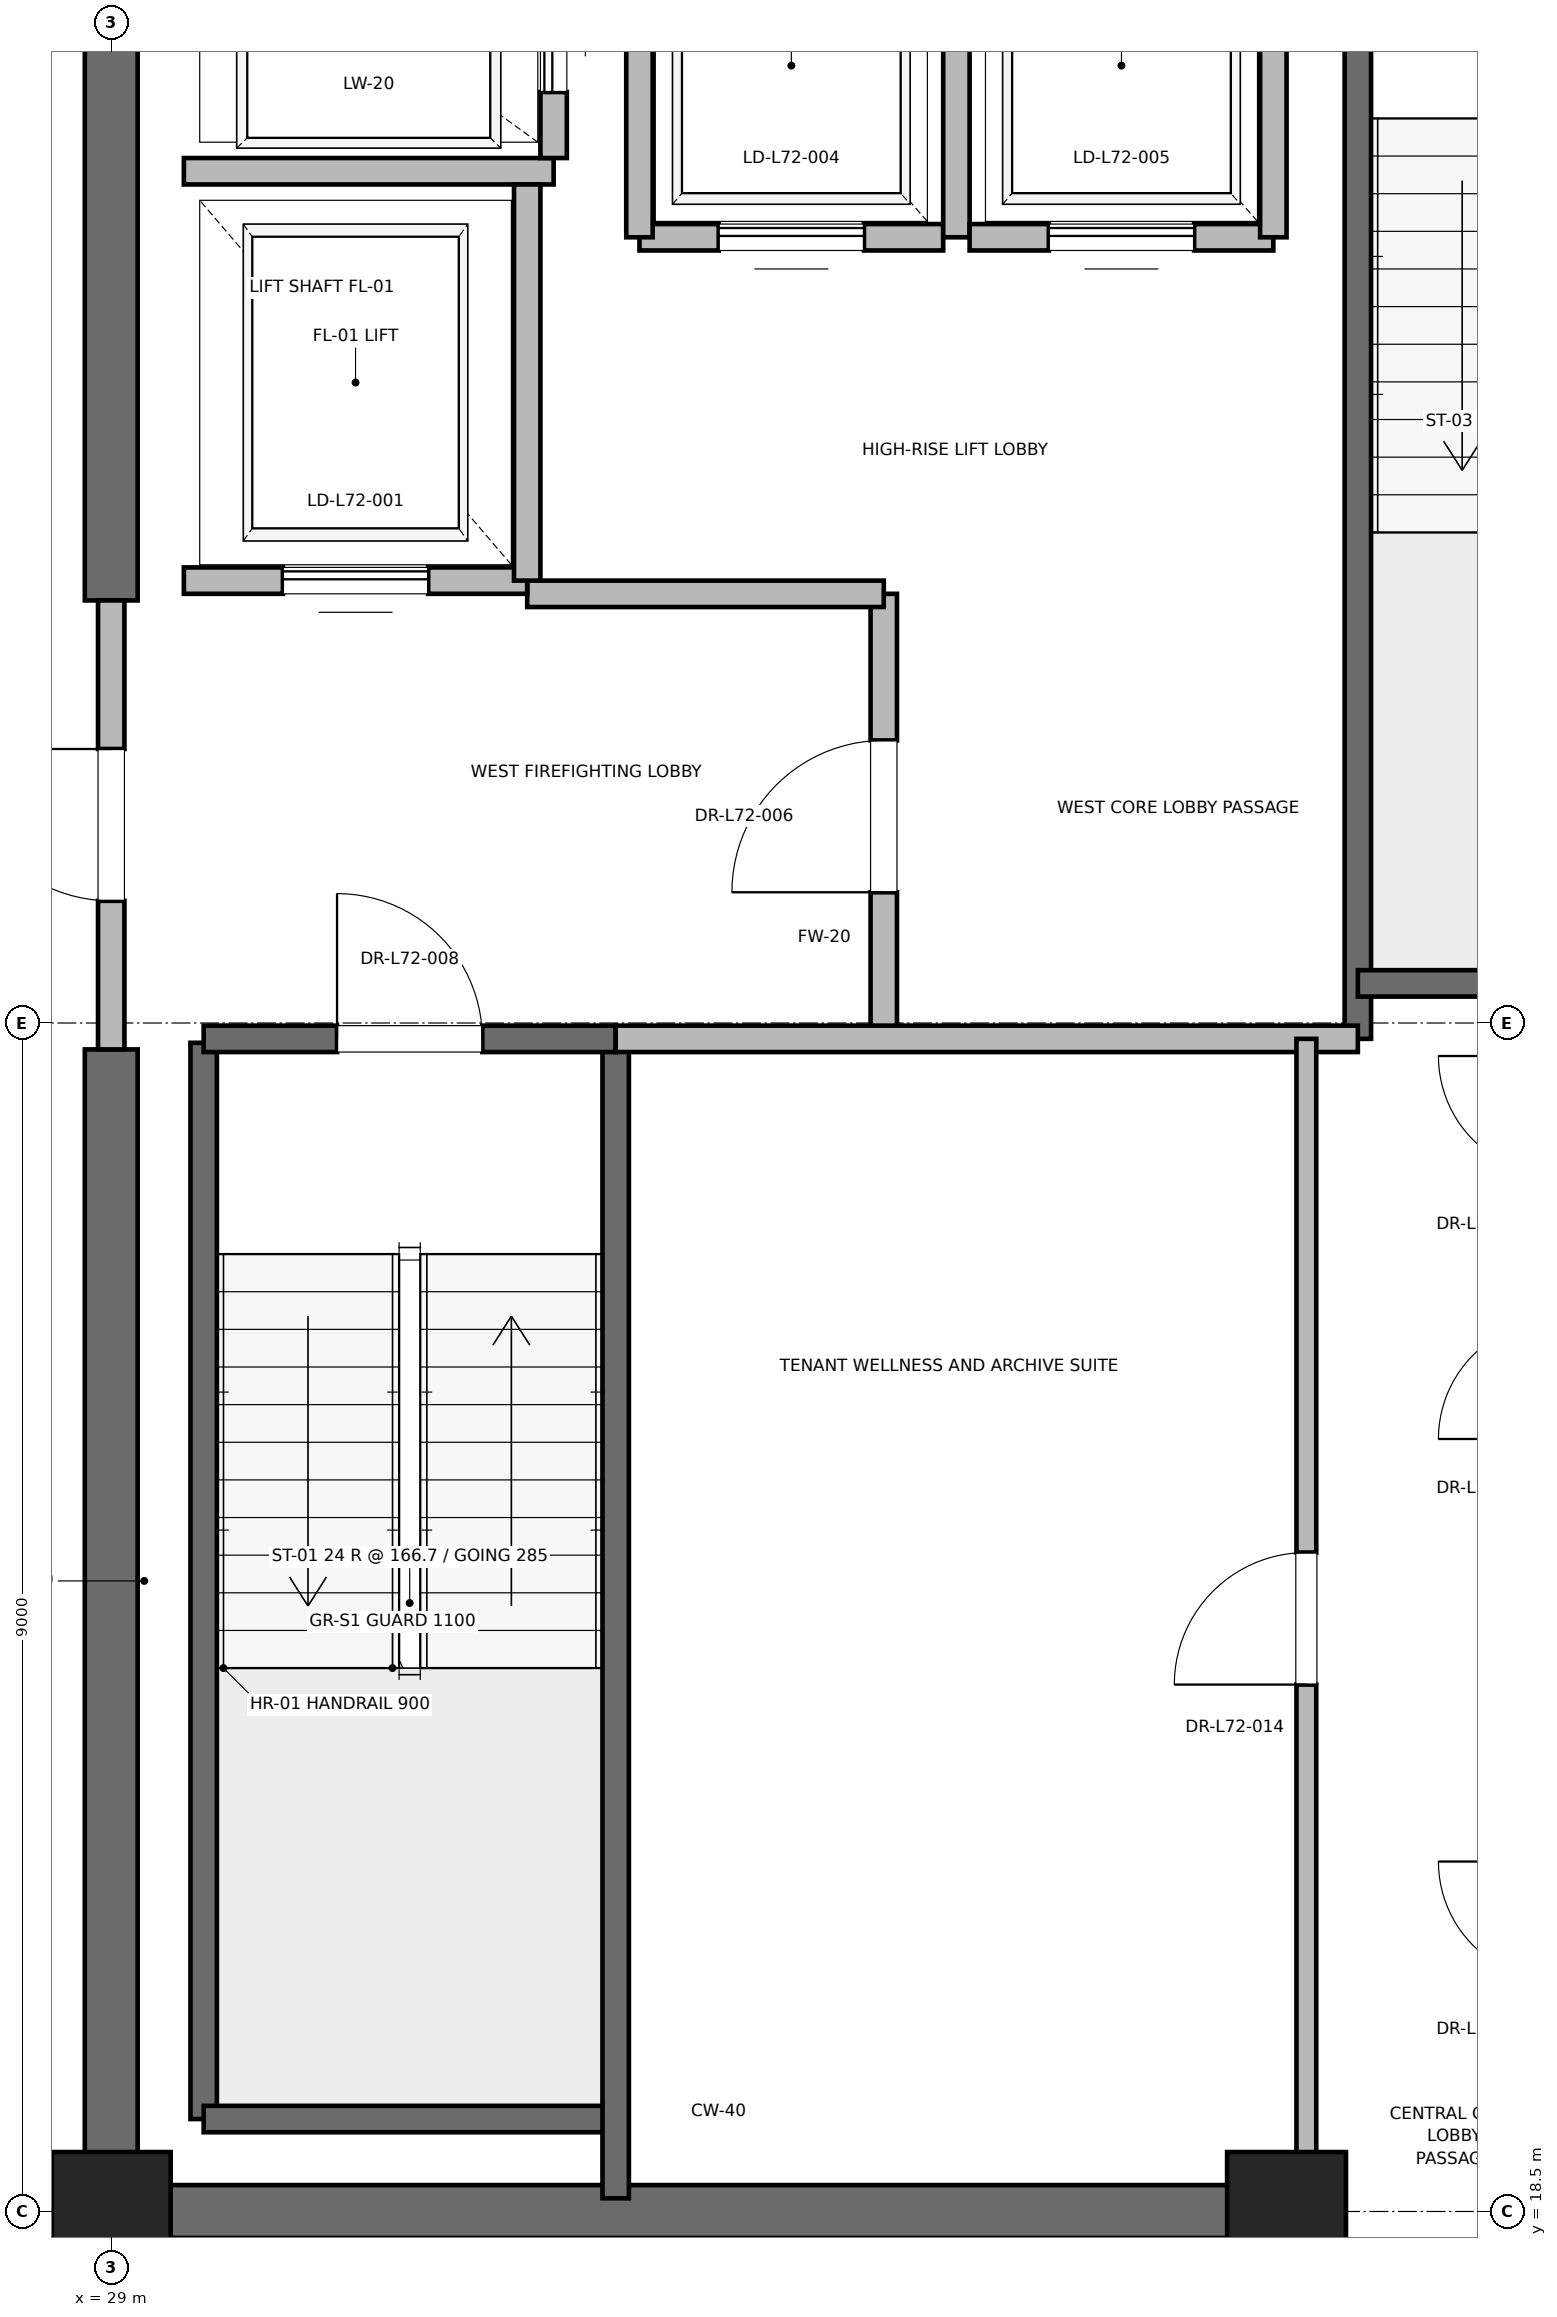
"""IFC4 building model, lengths in metres.
Left out: names, types, materials, properties, quantities, classifications, styles, units other than length and angle.
Written with IfcOpenShell. Run it as: python <this file> out.ifc"""

import sys

from ifc_helpers import new_model, si_unit, direction, frame, frame_2d, origin, origin_2d, place, context, subcontext, project, spatial, rectangle, extrude, element, fill, save


model = new_model("IFC4")
c1 = context("Model", 3, precision=1e-05, world=origin(), true_north=direction((0.0, 1.0)))
c2 = subcontext(c1, "Body", "Model", "MODEL_VIEW")
j1 = project(units=[si_unit("LENGTHUNIT", "METRE"), si_unit("PLANEANGLEUNIT", "RADIAN")], contexts=[c1])
p1 = place(None, origin())
s1 = spatial("IfcSite", under=j1, at=p1, CompositionType="ELEMENT")
p2 = place(p1, origin())
s2 = spatial("IfcBuilding", under=s1, at=p2, CompositionType="ELEMENT")
p3 = place(p2, frame((0.0, 0.0, 310.8)))
s3 = spatial("IfcBuildingStorey", under=s2, at=p3, CompositionType="ELEMENT", Elevation=310.8)
for number, where, z_axis, x_axis in (
    (1, (29.0, 18.5, 0.0), (0.0, 0.0, 1.0), (1.0, 0.0, 0.0)),
    (2, (37.9, 18.5, 0.0), (0.0, 0.0, 1.0), (1.0, 0.0, 0.0)),
):
    element("IfcColumn", number, at=place(p3, frame(where, z_axis=z_axis, x_axis=x_axis)), inside=s3, PredefinedType="PILASTER", context=c2, shape_type="SweptSolid", body=[
        extrude(rectangle(XDim=0.9, YDim=0.9, at=origin_2d()), origin(), (0.0, 0.0, 1.0), 4.0),
    ])
p4 = place(p3, frame((29.0, 18.5, 0.0), z_axis=(0.0, 0.0, 1.0), x_axis=(1.0, 0.0, 0.0)))
e3 = element("IfcWall", 3, at=p4, inside=s3, PredefinedType="SHEAR", context=c2, shape_type="SweptSolid", body=[
    extrude(rectangle(XDim=9.2, YDim=0.4, at=frame_2d((4.6, 0.0))), origin(), (0.0, 0.0, 1.0), 3.785),
])
p5 = place(p3, frame((29.0, 18.5, 0.0), z_axis=(0.0, 0.0, 1.0), x_axis=(0.0, 1.0, 0.0)))
e4 = element("IfcWall", 4, at=p5, inside=s3, PredefinedType="SHEAR", context=c2, shape_type="SweptSolid", body=[
    extrude(rectangle(XDim=8.8, YDim=0.4, at=frame_2d((4.4, 0.0))), origin(), (0.0, 0.0, 1.0), 3.785),
])
p6 = place(p3, frame((29.0, 30.7, 0.0), z_axis=(0.0, 0.0, 1.0), x_axis=(0.0, 1.0, 0.0)))
e5 = element("IfcWall", 5, at=p6, inside=s3, PredefinedType="SHEAR", context=c2, shape_type="SweptSolid", body=[
    extrude(rectangle(XDim=5.8, YDim=0.4, at=frame_2d((2.9, 0.0))), origin(), (0.0, 0.0, 1.0), 3.785),
])
p7 = place(p3, frame((29.7, 19.2, 0.0), z_axis=(0.0, 0.0, 1.0), x_axis=(0.0, 1.0, 0.0)))
e6 = element("IfcWall", 6, at=p7, inside=s3, PredefinedType="SOLIDWALL", context=c2, shape_type="SweptSolid", body=[
    extrude(rectangle(XDim=8.15, YDim=0.2, at=frame_2d((4.075, 0.0))), origin(), (0.0, 0.0, 1.0), 3.785),
])
p8 = place(p3, frame((29.7, 19.2, 0.0), z_axis=(0.0, 0.0, 1.0), x_axis=(1.0, 0.0, 0.0)))
e7 = element("IfcWall", 7, at=p8, inside=s3, PredefinedType="SOLIDWALL", context=c2, shape_type="SweptSolid", body=[
    extrude(rectangle(XDim=3.12, YDim=0.2, at=frame_2d((1.56, 0.0))), origin(), (0.0, 0.0, 1.0), 3.785),
])
p9 = place(p3, frame((32.82, 18.6, 0.0), z_axis=(0.0, 0.0, 1.0), x_axis=(0.0, 1.0, 0.0)))
e8 = element("IfcWall", 8, at=p9, inside=s3, PredefinedType="SOLIDWALL", context=c2, shape_type="SweptSolid", body=[
    extrude(rectangle(XDim=8.78, YDim=0.2, at=frame_2d((4.39, 0.0))), origin(), (0.0, 0.0, 1.0), 3.785),
])
p10 = place(p3, frame((29.7, 27.38, 0.0), z_axis=(0.0, 0.0, 1.0), x_axis=(1.0, 0.0, 0.0)))
e9 = element("IfcWall", 9, at=p10, inside=s3, PredefinedType="SOLIDWALL", context=c2, shape_type="SweptSolid", body=[
    extrude(rectangle(XDim=3.12, YDim=0.2, at=frame_2d((1.56, 0.0))), origin(), (0.0, 0.0, 1.0), 3.785),
])
p11 = place(p10, frame((1.01, 0.0, 0.0)))
e10 = element("IfcOpeningElement", 10, at=p11, cuts=e9, PredefinedType="OPENING", context=c2, shape_type="SweptSolid", body=[
    extrude(rectangle(XDim=1.1, YDim=2.15, at=frame_2d((0.55, 1.075))), frame((0.0, 0.1, 0.0), z_axis=(0.0, -1.0, 0.0), x_axis=(1.0, 0.0, 0.0)), (0.0, 0.0, 1.0), 0.2),
])
p12 = place(p3, frame((38.44, 27.38, 0.0), z_axis=(0.0, 0.0, 1.0), x_axis=(0.0, 1.0, 0.0)))
e11 = element("IfcWall", 11, at=p12, inside=s3, PredefinedType="SOLIDWALL", context=c2, shape_type="SweptSolid", body=[
    extrude(rectangle(XDim=8.87, YDim=0.2, at=frame_2d((4.435, 0.0))), origin(), (0.0, 0.0, 1.0), 3.785),
])
p13 = place(p3, frame((38.44, 27.8, 0.0), z_axis=(0.0, 0.0, 1.0), x_axis=(1.0, 0.0, 0.0)))
e12 = element("IfcWall", 12, at=p13, inside=s3, PredefinedType="SOLIDWALL", context=c2, shape_type="SweptSolid", body=[
    extrude(rectangle(XDim=3.32, YDim=0.2, at=frame_2d((1.66, 0.0))), origin(), (0.0, 0.0, 1.0), 3.785),
])
p14 = place(p3, frame((34.85, 27.38, 0.0), z_axis=(0.0, 0.0, 1.0), x_axis=(0.0, 1.0, 0.0)))
e13 = element("IfcWall", 13, at=p14, inside=s3, PredefinedType="PARTITIONING", context=c2, shape_type="SweptSolid", body=[
    extrude(rectangle(XDim=3.37, YDim=0.2, at=frame_2d((1.685, 0.0))), origin(), (0.0, 0.0, 1.0), 3.785),
])
p15 = place(p14, frame((1.11, 0.0, 0.0)))
e14 = element("IfcOpeningElement", 14, at=p15, cuts=e13, PredefinedType="OPENING", context=c2, shape_type="SweptSolid", body=[
    extrude(rectangle(XDim=1.15, YDim=2.2, at=frame_2d((0.575, 1.1))), frame((0.0, 0.1, 0.0), z_axis=(0.0, -1.0, 0.0), x_axis=(1.0, 0.0, 0.0)), (0.0, 0.0, 1.0), 0.2),
])
p16 = place(p3, frame((29.0, 27.3, 0.0), z_axis=(0.0, 0.0, 1.0), x_axis=(0.0, 1.0, 0.0)))
e15 = element("IfcWall", 15, at=p16, inside=s3, PredefinedType="PARTITIONING", context=c2, shape_type="SweptSolid", body=[
    extrude(rectangle(XDim=3.4, YDim=0.2, at=frame_2d((1.7, 0.0))), origin(), (0.0, 0.0, 1.0), 2.865),
])
p17 = place(p16, frame((1.125, 0.0, 0.0)))
e16 = element("IfcOpeningElement", 16, at=p17, cuts=e15, PredefinedType="OPENING", context=c2, shape_type="SweptSolid", body=[
    extrude(rectangle(XDim=1.15, YDim=2.2, at=frame_2d((0.575, 1.1))), frame((0.0, 0.1, 0.0), z_axis=(0.0, -1.0, 0.0), x_axis=(1.0, 0.0, 0.0)), (0.0, 0.0, 1.0), 0.2),
])
p18 = place(p3, frame((32.82, 27.38, 0.0), z_axis=(0.0, 0.0, 1.0), x_axis=(1.0, 0.0, 0.0)))
e17 = element("IfcWall", 17, at=p18, inside=s3, PredefinedType="PARTITIONING", context=c2, shape_type="SweptSolid", body=[
    extrude(rectangle(XDim=5.62, YDim=0.2, at=frame_2d((2.81, 0.0))), origin(), (0.0, 0.0, 1.0), 3.785),
])
p19 = place(p3, frame((32.15, 30.75, 0.0), z_axis=(0.0, 0.0, 1.0), x_axis=(1.0, 0.0, 0.0)))
e18 = element("IfcWall", 18, at=p19, inside=s3, PredefinedType="PARTITIONING", context=c2, shape_type="SweptSolid", body=[
    extrude(rectangle(XDim=2.7, YDim=0.2, at=frame_2d((1.35, 0.0))), origin(), (0.0, 0.0, 1.0), 3.785),
])
p20 = place(p3, frame((29.55, 30.85, 0.0), z_axis=(0.0, 0.0, 1.0), x_axis=(1.0, 0.0, 0.0)))
e19 = element("IfcWall", 19, at=p20, inside=s3, PredefinedType="SOLIDWALL", context=c2, shape_type="SweptSolid", body=[
    extrude(rectangle(XDim=2.6, YDim=0.2, at=frame_2d((1.3, 0.0))), origin(), (0.0, 0.0, 1.0), 2.865),
])
p21 = place(p20, frame((0.75, 0.0, 0.0)))
e20 = element("IfcOpeningElement", 20, at=p21, cuts=e19, PredefinedType="OPENING", context=c2, shape_type="SweptSolid", body=[
    extrude(rectangle(XDim=1.1, YDim=2.2, at=frame_2d((0.55, 1.1))), frame((0.0, 0.1, 0.0), z_axis=(0.0, -1.0, 0.0), x_axis=(1.0, 0.0, 0.0)), (0.0, 0.0, 1.0), 0.2),
])
p22 = place(p3, frame((29.55, 33.95, 0.0), z_axis=(0.0, 0.0, 1.0), x_axis=(1.0, 0.0, 0.0)))
e21 = element("IfcWall", 21, at=p22, inside=s3, PredefinedType="SOLIDWALL", context=c2, shape_type="SweptSolid", body=[
    extrude(rectangle(XDim=2.8, YDim=0.2, at=frame_2d((1.4, 0.0))), origin(), (0.0, 0.0, 1.0), 3.785),
])
p23 = place(p3, frame((32.15, 30.85, 0.0), z_axis=(0.0, 0.0, 1.0), x_axis=(0.0, 1.0, 0.0)))
e22 = element("IfcWall", 22, at=p23, inside=s3, PredefinedType="SOLIDWALL", context=c2, shape_type="SweptSolid", body=[
    extrude(rectangle(XDim=3.0, YDim=0.2, at=frame_2d((1.5, 0.0))), origin(), (0.0, 0.0, 1.0), 3.785),
])
p24 = place(p3, frame((32.35, 34.05, 0.0), z_axis=(0.0, 0.0, 1.0), x_axis=(0.0, 1.0, 0.0)))
e23 = element("IfcWall", 23, at=p24, inside=s3, PredefinedType="SOLIDWALL", context=c2, shape_type="SweptSolid", body=[
    extrude(rectangle(XDim=2.1, YDim=0.2, at=frame_2d((1.05, 0.0))), origin(), (0.0, 0.0, 1.0), 3.785),
])
p25 = place(p24, frame((0.5, 0.0, 0.0)))
e24 = element("IfcOpeningElement", 24, at=p25, cuts=e23, PredefinedType="OPENING", context=c2, shape_type="SweptSolid", body=[
    extrude(rectangle(XDim=1.1, YDim=2.2, at=frame_2d((0.55, 1.1))), frame((0.0, 0.1, 0.0), z_axis=(0.0, -1.0, 0.0), x_axis=(1.0, 0.0, 0.0)), (0.0, 0.0, 1.0), 0.2),
])
p26 = place(p3, frame((33.0, 33.45, 0.0), z_axis=(0.0, 0.0, 1.0), x_axis=(1.0, 0.0, 0.0)))
e25 = element("IfcWall", 25, at=p26, inside=s3, PredefinedType="SOLIDWALL", context=c2, shape_type="SweptSolid", body=[
    extrude(rectangle(XDim=2.3, YDim=0.2, at=frame_2d((1.15, 0.0))), origin(), (0.0, 0.0, 1.0), 3.785),
])
p27 = place(p26, frame((0.6, 0.0, 0.0)))
e26 = element("IfcOpeningElement", 26, at=p27, cuts=e25, PredefinedType="OPENING", context=c2, shape_type="SweptSolid", body=[
    extrude(rectangle(XDim=1.1, YDim=2.2, at=frame_2d((0.55, 1.1))), frame((0.0, 0.1, 0.0), z_axis=(0.0, -1.0, 0.0), x_axis=(1.0, 0.0, 0.0)), (0.0, 0.0, 1.0), 0.2),
])
p28 = place(p3, frame((33.0, 36.05, 0.0), z_axis=(0.0, 0.0, 1.0), x_axis=(0.0, -1.0, 0.0)))
e27 = element("IfcWall", 27, at=p28, inside=s3, PredefinedType="SOLIDWALL", context=c2, shape_type="SweptSolid", body=[
    extrude(rectangle(XDim=2.6, YDim=0.2, at=frame_2d((1.3, 0.0))), origin(), (0.0, 0.0, 1.0), 3.785),
])
p29 = place(p3, frame((35.4, 33.45, 0.0), z_axis=(0.0, 0.0, 1.0), x_axis=(0.0, 1.0, 0.0)))
e28 = element("IfcWall", 28, at=p29, inside=s3, PredefinedType="SOLIDWALL", context=c2, shape_type="SweptSolid", body=[
    extrude(rectangle(XDim=2.6, YDim=0.2, at=frame_2d((1.3, 0.0))), origin(), (0.0, 0.0, 1.0), 2.865),
])
p30 = place(p3, frame((35.5, 33.45, 0.0), z_axis=(0.0, 0.0, 1.0), x_axis=(1.0, 0.0, 0.0)))
e29 = element("IfcWall", 29, at=p30, inside=s3, PredefinedType="SOLIDWALL", context=c2, shape_type="SweptSolid", body=[
    extrude(rectangle(XDim=2.3, YDim=0.2, at=frame_2d((1.15, 0.0))), origin(), (0.0, 0.0, 1.0), 3.785),
])
p31 = place(p30, frame((0.6, 0.0, 0.0)))
e30 = element("IfcOpeningElement", 30, at=p31, cuts=e29, PredefinedType="OPENING", context=c2, shape_type="SweptSolid", body=[
    extrude(rectangle(XDim=1.1, YDim=2.2, at=frame_2d((0.55, 1.1))), frame((0.0, 0.1, 0.0), z_axis=(0.0, -1.0, 0.0), x_axis=(1.0, 0.0, 0.0)), (0.0, 0.0, 1.0), 0.2),
])
p32 = place(p3, frame((37.8, 33.45, 0.0), z_axis=(0.0, 0.0, 1.0), x_axis=(0.0, 1.0, 0.0)))
e31 = element("IfcWall", 31, at=p32, inside=s3, PredefinedType="SOLIDWALL", context=c2, shape_type="SweptSolid", body=[
    extrude(rectangle(XDim=2.6, YDim=0.2, at=frame_2d((1.3, 0.0))), origin(), (0.0, 0.0, 1.0), 2.865),
])
p33 = place(p3, frame((38.05, 18.6, 0.0), z_axis=(0.0, 0.0, 1.0), x_axis=(0.0, 1.0, 0.0)))
e32 = element("IfcWall", 32, at=p33, inside=s3, PredefinedType="PARTITIONING", context=c2, shape_type="SweptSolid", body=[
    extrude(rectangle(XDim=8.78, YDim=0.15, at=frame_2d((4.39, 0.0))), origin(), (0.0, 0.0, 1.0), 2.85),
])
p34 = place(p33, frame((3.89, 0.0, 0.0)))
e33 = element("IfcOpeningElement", 33, at=p34, cuts=e32, PredefinedType="OPENING", context=c2, shape_type="SweptSolid", body=[
    extrude(rectangle(XDim=1.0, YDim=2.15, at=frame_2d((0.5, 1.075))), frame((0.0, 0.075, 0.0), z_axis=(0.0, -1.0, 0.0), x_axis=(1.0, 0.0, 0.0)), (0.0, 0.0, 1.0), 0.15),
])
p35 = place(p11, origin())
e34 = element("IfcDoor", 34, at=p35, inside=s3, OperationType="SINGLE_SWING_LEFT", PredefinedType="DOOR", context=c2, shape_type="SweptSolid", body=[
    extrude(rectangle(XDim=1.1, YDim=2.15, at=frame_2d((0.55, 1.075))), frame((0.0, 0.025, 0.0), z_axis=(0.0, -1.0, 0.0), x_axis=(1.0, 0.0, 0.0)), (0.0, 0.0, 1.0), 0.05),
])
fill(e10, e34)
p36 = place(p15, origin())
e35 = element("IfcDoor", 35, at=p36, inside=s3, OperationType="SINGLE_SWING_LEFT", PredefinedType="DOOR", context=c2, shape_type="SweptSolid", body=[
    extrude(rectangle(XDim=1.15, YDim=2.2, at=frame_2d((0.575, 1.1))), frame((0.0, 0.025, 0.0), z_axis=(0.0, -1.0, 0.0), x_axis=(1.0, 0.0, 0.0)), (0.0, 0.0, 1.0), 0.05),
])
fill(e14, e35)
p37 = place(p17, origin())
e36 = element("IfcDoor", 36, at=p37, inside=s3, OperationType="SINGLE_SWING_RIGHT", PredefinedType="DOOR", context=c2, shape_type="SweptSolid", body=[
    extrude(rectangle(XDim=1.15, YDim=2.2, at=frame_2d((0.575, 1.1))), frame((0.0, 0.025, 0.0), z_axis=(0.0, -1.0, 0.0), x_axis=(1.0, 0.0, 0.0)), (0.0, 0.0, 1.0), 0.05),
])
fill(e16, e36)
p38 = place(p21, origin())
e37 = element("IfcDoor", 37, at=p38, inside=s3, OperationType="SLIDING_TO_RIGHT", PredefinedType="DOOR", context=c2, shape_type="SweptSolid", body=[
    extrude(rectangle(XDim=1.1, YDim=2.2, at=frame_2d((0.55, 1.1))), frame((0.0, 0.025, 0.0), z_axis=(0.0, -1.0, 0.0), x_axis=(1.0, 0.0, 0.0)), (0.0, 0.0, 1.0), 0.05),
])
fill(e20, e37)
p39 = place(p25, origin())
e38 = element("IfcDoor", 38, at=p39, inside=s3, OperationType="SLIDING_TO_RIGHT", PredefinedType="DOOR", context=c2, shape_type="SweptSolid", body=[
    extrude(rectangle(XDim=1.1, YDim=2.2, at=frame_2d((0.55, 1.1))), frame((0.0, 0.025, 0.0), z_axis=(0.0, -1.0, 0.0), x_axis=(1.0, 0.0, 0.0)), (0.0, 0.0, 1.0), 0.05),
])
fill(e24, e38)
p40 = place(p27, origin())
e39 = element("IfcDoor", 39, at=p40, inside=s3, OperationType="SLIDING_TO_RIGHT", PredefinedType="DOOR", context=c2, shape_type="SweptSolid", body=[
    extrude(rectangle(XDim=1.1, YDim=2.2, at=frame_2d((0.55, 1.1))), frame((0.0, 0.025, 0.0), z_axis=(0.0, -1.0, 0.0), x_axis=(1.0, 0.0, 0.0)), (0.0, 0.0, 1.0), 0.05),
])
fill(e26, e39)
p41 = place(p31, origin())
e40 = element("IfcDoor", 40, at=p41, inside=s3, OperationType="SLIDING_TO_RIGHT", PredefinedType="DOOR", context=c2, shape_type="SweptSolid", body=[
    extrude(rectangle(XDim=1.1, YDim=2.2, at=frame_2d((0.55, 1.1))), frame((0.0, 0.025, 0.0), z_axis=(0.0, -1.0, 0.0), x_axis=(1.0, 0.0, 0.0)), (0.0, 0.0, 1.0), 0.05),
])
fill(e30, e40)
p42 = place(p34, origin())
e41 = element("IfcDoor", 41, at=p42, inside=s3, OperationType="SINGLE_SWING_LEFT", PredefinedType="DOOR", context=c2, shape_type="SweptSolid", body=[
    extrude(rectangle(XDim=1.0, YDim=2.15, at=frame_2d((0.5, 1.075))), frame((0.0, 0.025, 0.0), z_axis=(0.0, -1.0, 0.0), x_axis=(1.0, 0.0, 0.0)), (0.0, 0.0, 1.0), 0.05),
])
fill(e33, e41)
save(model, sys.argv[1])
